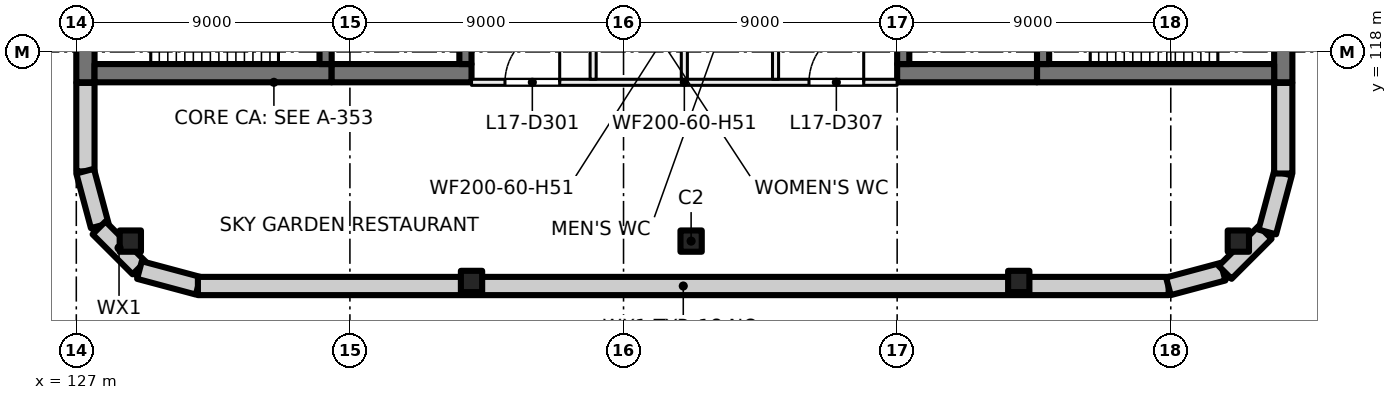
"""IFC4 building model, lengths in metres.
Left out: names, types, materials, properties, quantities, classifications, styles, units other than length and angle.
Written with IfcOpenShell. Run it as: python <this file> out.ifc"""

import sys

from ifc_helpers import new_model, si_unit, direction, frame, frame_2d, origin, origin_2d, place, context, subcontext, project, spatial, rectangle, extrude, element, fill, save


model = new_model("IFC4")
c1 = context("Model", 3, precision=1e-05, world=origin(), true_north=direction((0.0, 1.0)))
c2 = subcontext(c1, "Body", "Model", "MODEL_VIEW")
j1 = project(units=[si_unit("LENGTHUNIT", "METRE"), si_unit("PLANEANGLEUNIT", "RADIAN")], contexts=[c1])
p1 = place(None, origin())
s1 = spatial("IfcSite", under=j1, at=p1, CompositionType="ELEMENT")
p2 = place(p1, origin())
s2 = spatial("IfcBuilding", under=s1, at=p2, CompositionType="ELEMENT")
p3 = place(p2, frame((0.0, 0.0, 75.5)))
s3 = spatial("IfcBuildingStorey", under=s2, at=p3, CompositionType="ELEMENT", Elevation=75.5)
for number, where, z_axis, x_axis in (
    (1, (128.777, 111.777, 0.0), (0.0, 0.0, 1.0), (1.0, 0.0, 0.0)),
    (2, (140.0, 110.45, 0.0), (0.0, 0.0, 1.0), (1.0, 0.0, 0.0)),
    (3, (147.223, 111.777, 0.0), (0.0, 0.0, 1.0), (1.0, 0.0, 0.0)),
    (4, (165.223, 111.777, 0.0), (0.0, 0.0, 1.0), (1.0, 0.0, 0.0)),
    (5, (158.0, 110.45, 0.0), (0.0, 0.0, 1.0), (1.0, 0.0, 0.0)),
):
    element("IfcColumn", number, at=place(p3, frame(where, z_axis=z_axis, x_axis=x_axis)), inside=s3, PredefinedType="COLUMN", context=c2, shape_type="SweptSolid", body=[
        extrude(rectangle(XDim=0.7, YDim=0.7, at=origin_2d()), origin(), (0.0, 0.0, 1.0), 5.5),
    ])
p4 = place(p3, frame((127.3, 117.0, 0.0), z_axis=(0.0, 0.0, 1.0), x_axis=(0.0, 1.0, 0.0)))
e6 = element("IfcWall", 6, at=p4, inside=s3, PredefinedType="SHEAR", context=c2, shape_type="SweptSolid", body=[
    extrude(rectangle(XDim=3.8, YDim=0.6, at=frame_2d((1.9, 0.0))), origin(), (0.0, 0.0, 1.0), 5.5),
])
p5 = place(p3, frame((127.6, 117.3, 0.0), z_axis=(0.0, 0.0, 1.0), x_axis=(1.0, 0.0, 0.0)))
e7 = element("IfcWall", 7, at=p5, inside=s3, PredefinedType="SHEAR", context=c2, shape_type="SweptSolid", body=[
    extrude(rectangle(XDim=7.8, YDim=0.6, at=frame_2d((3.9, 0.0))), origin(), (0.0, 0.0, 1.0), 5.5),
])
p6 = place(p3, frame((135.4, 117.3, 0.0), z_axis=(0.0, 0.0, 1.0), x_axis=(1.0, 0.0, 0.0)))
e8 = element("IfcWall", 8, at=p6, inside=s3, PredefinedType="SHEAR", context=c2, shape_type="SweptSolid", body=[
    extrude(rectangle(XDim=4.6, YDim=0.6, at=frame_2d((2.3, 0.0))), origin(), (0.0, 0.0, 1.0), 5.5),
])
p7 = place(p3, frame((135.2, 117.6, 0.0), z_axis=(0.0, 0.0, 1.0), x_axis=(0.0, 1.0, 0.0)))
e9 = element("IfcWall", 9, at=p7, inside=s3, PredefinedType="SHEAR", context=c2, shape_type="SweptSolid", body=[
    extrude(rectangle(XDim=2.8, YDim=0.4, at=frame_2d((1.4, 0.0))), origin(), (0.0, 0.0, 1.0), 5.5),
])
p8 = place(p7, frame((0.9, 0.0, 0.0)))
e10 = element("IfcOpeningElement", 10, at=p8, cuts=e9, PredefinedType="OPENING", context=c2, shape_type="SweptSolid", body=[
    extrude(rectangle(XDim=1.0, YDim=2.1, at=frame_2d((0.5, 1.05))), frame((0.0, 0.21, 0.0), z_axis=(0.0, -1.0, 0.0), x_axis=(1.0, 0.0, 0.0)), (0.0, 0.0, 1.0), 0.42),
])
p9 = place(p3, frame((139.8, 117.6, 0.0), z_axis=(0.0, 0.0, 1.0), x_axis=(0.0, 1.0, 0.0)))
e11 = element("IfcWall", 11, at=p9, inside=s3, PredefinedType="SHEAR", context=c2, shape_type="SweptSolid", body=[
    extrude(rectangle(XDim=8.6, YDim=0.4, at=frame_2d((4.3, 0.0))), origin(), (0.0, 0.0, 1.0), 5.5),
])
p10 = place(p3, frame((166.7, 120.8, 0.0), z_axis=(0.0, 0.0, 1.0), x_axis=(0.0, -1.0, 0.0)))
e12 = element("IfcWall", 12, at=p10, inside=s3, PredefinedType="SHEAR", context=c2, shape_type="SweptSolid", body=[
    extrude(rectangle(XDim=3.8, YDim=0.6, at=frame_2d((1.9, 0.0))), origin(), (0.0, 0.0, 1.0), 5.5),
])
p11 = place(p3, frame((166.4, 117.3, 0.0), z_axis=(0.0, 0.0, 1.0), x_axis=(-1.0, 0.0, 0.0)))
e13 = element("IfcWall", 13, at=p11, inside=s3, PredefinedType="SHEAR", context=c2, shape_type="SweptSolid", body=[
    extrude(rectangle(XDim=7.8, YDim=0.6, at=frame_2d((3.9, 0.0))), origin(), (0.0, 0.0, 1.0), 5.5),
])
p12 = place(p3, frame((158.6, 117.3, 0.0), z_axis=(0.0, 0.0, 1.0), x_axis=(-1.0, 0.0, 0.0)))
e14 = element("IfcWall", 14, at=p12, inside=s3, PredefinedType="SHEAR", context=c2, shape_type="SweptSolid", body=[
    extrude(rectangle(XDim=4.6, YDim=0.6, at=frame_2d((2.3, 0.0))), origin(), (0.0, 0.0, 1.0), 5.5),
])
p13 = place(p3, frame((158.8, 120.4, 0.0), z_axis=(0.0, 0.0, 1.0), x_axis=(0.0, -1.0, 0.0)))
e15 = element("IfcWall", 15, at=p13, inside=s3, PredefinedType="SHEAR", context=c2, shape_type="SweptSolid", body=[
    extrude(rectangle(XDim=2.8, YDim=0.4, at=frame_2d((1.4, 0.0))), origin(), (0.0, 0.0, 1.0), 5.5),
])
p14 = place(p13, frame((0.9, 0.0, 0.0)))
e16 = element("IfcOpeningElement", 16, at=p14, cuts=e15, PredefinedType="OPENING", context=c2, shape_type="SweptSolid", body=[
    extrude(rectangle(XDim=1.0, YDim=2.1, at=frame_2d((0.5, 1.05))), frame((0.0, 0.21, 0.0), z_axis=(0.0, -1.0, 0.0), x_axis=(1.0, 0.0, 0.0)), (0.0, 0.0, 1.0), 0.42),
])
p15 = place(p3, frame((154.2, 126.2, 0.0), z_axis=(0.0, 0.0, 1.0), x_axis=(0.0, -1.0, 0.0)))
e17 = element("IfcWall", 17, at=p15, inside=s3, PredefinedType="SHEAR", context=c2, shape_type="SweptSolid", body=[
    extrude(rectangle(XDim=8.6, YDim=0.4, at=frame_2d((4.3, 0.0))), origin(), (0.0, 0.0, 1.0), 5.5),
])
p16 = place(p3, frame((127.3, 114.07, 0.0), z_axis=(0.0, 0.0, 1.0), x_axis=(0.0, 1.0, 0.0)))
e18 = element("IfcWall", 18, at=p16, inside=s3, PredefinedType="SOLIDWALL", context=c2, shape_type="SweptSolid", body=[
    extrude(rectangle(XDim=2.91, YDim=0.6, at=frame_2d((1.455, 0.0))), origin(), (0.0, 0.0, 1.0), 5.125),
])
for number, where, z_axis, x_axis in (
    (19, (127.771, 112.281, 0.0), (0.0, 0.0, 1.0), (-0.259, 0.966, 0.0)),
    (20, (129.064, 110.896, 0.0), (0.0, 0.0, 1.0), (-0.707, 0.707, 0.0)),
):
    element("IfcWall", number, at=place(p3, frame(where, z_axis=z_axis, x_axis=x_axis)), inside=s3, PredefinedType="SOLIDWALL", context=c2, shape_type="SweptSolid", body=[
        extrude(rectangle(XDim=1.861, YDim=0.6, at=frame_2d((0.93, 0.0))), origin(), (0.0, 0.0, 1.0), 5.125),
    ])
p17 = place(p3, frame((131.01, 110.308, 0.0), z_axis=(0.0, 0.0, 1.0), x_axis=(-0.965920269068, 0.258839784042, 0.0)))
e21 = element("IfcWall", 21, at=p17, inside=s3, PredefinedType="SOLIDWALL", context=c2, shape_type="SweptSolid", body=[
    extrude(rectangle(XDim=2.0, YDim=0.6, at=frame_2d((1.0, 0.0))), origin(), (0.0, 0.0, 1.0), 5.125),
])
p18 = place(p3, frame((162.93, 110.3, 0.0), z_axis=(0.0, 0.0, 1.0), x_axis=(-1.0, 0.0, 0.0)))
e22 = element("IfcWall", 22, at=p18, inside=s3, PredefinedType="SOLIDWALL", context=c2, shape_type="SweptSolid", body=[
    extrude(rectangle(XDim=31.93, YDim=0.6, at=frame_2d((15.965, 0.0))), origin(), (0.0, 0.0, 1.0), 5.125),
])
for number, where, z_axis, x_axis in (
    (23, (164.719, 110.771, 0.0), (0.0, 0.0, 1.0), (-0.966, -0.259, 0.0)),
    (24, (166.104, 112.064, 0.0), (0.0, 0.0, 1.0), (-0.707, -0.707, 0.0)),
):
    element("IfcWall", number, at=place(p3, frame(where, z_axis=z_axis, x_axis=x_axis)), inside=s3, PredefinedType="SOLIDWALL", context=c2, shape_type="SweptSolid", body=[
        extrude(rectangle(XDim=1.861, YDim=0.6, at=frame_2d((0.93, 0.0))), origin(), (0.0, 0.0, 1.0), 5.125),
    ])
p19 = place(p3, frame((166.692, 114.01, 0.0), z_axis=(0.0, 0.0, 1.0), x_axis=(-0.258839784042, -0.965920269068, 0.0)))
e25 = element("IfcWall", 25, at=p19, inside=s3, PredefinedType="SOLIDWALL", context=c2, shape_type="SweptSolid", body=[
    extrude(rectangle(XDim=2.0, YDim=0.6, at=frame_2d((1.0, 0.0))), origin(), (0.0, 0.0, 1.0), 5.125),
])
p20 = place(p3, frame((166.7, 116.98, 0.0), z_axis=(0.0, 0.0, 1.0), x_axis=(0.0, -1.0, 0.0)))
e26 = element("IfcWall", 26, at=p20, inside=s3, PredefinedType="SOLIDWALL", context=c2, shape_type="SweptSolid", body=[
    extrude(rectangle(XDim=2.98, YDim=0.6, at=frame_2d((1.49, 0.0))), origin(), (0.0, 0.0, 1.0), 5.125),
])
p21 = place(p3, frame((154.0, 117.0, 0.0), z_axis=(0.0, 0.0, 1.0), x_axis=(-1.0, 0.0, 0.0)))
e27 = element("IfcWall", 27, at=p21, inside=s3, PredefinedType="PARTITIONING", context=c2, shape_type="SweptSolid", body=[
    extrude(rectangle(XDim=14.0, YDim=0.2, at=frame_2d((7.0, 0.0))), origin(), (0.0, 0.0, 1.0), 5.125),
])
p22 = place(p21, frame((11.1, 0.0, 0.0)))
e28 = element("IfcOpeningElement", 28, at=p22, cuts=e27, PredefinedType="OPENING", context=c2, shape_type="SweptSolid", body=[
    extrude(rectangle(XDim=1.8, YDim=2.1, at=frame_2d((0.9, 1.05))), frame((0.0, 0.11, 0.0), z_axis=(0.0, -1.0, 0.0), x_axis=(1.0, 0.0, 0.0)), (0.0, 0.0, 1.0), 0.22),
])
p23 = place(p21, frame((1.1, 0.0, 0.0)))
e29 = element("IfcOpeningElement", 29, at=p23, cuts=e27, PredefinedType="OPENING", context=c2, shape_type="SweptSolid", body=[
    extrude(rectangle(XDim=1.8, YDim=2.1, at=frame_2d((0.9, 1.05))), frame((0.0, 0.11, 0.0), z_axis=(0.0, -1.0, 0.0), x_axis=(1.0, 0.0, 0.0)), (0.0, 0.0, 1.0), 0.22),
])
p24 = place(p3, frame((144.0, 138.9, 0.0), z_axis=(0.0, 0.0, 1.0), x_axis=(0.0, -1.0, 0.0)))
e30 = element("IfcWall", 30, at=p24, inside=s3, PredefinedType="PARTITIONING", context=c2, shape_type="SweptSolid", body=[
    extrude(rectangle(XDim=21.8, YDim=0.2, at=frame_2d((10.9, 0.0))), origin(), (0.0, 0.0, 1.0), 5.125),
])
p25 = place(p24, frame((18.898, 0.0, 0.0)))
e31 = element("IfcOpeningElement", 31, at=p25, cuts=e30, PredefinedType="OPENING", context=c2, shape_type="SweptSolid", body=[
    extrude(rectangle(XDim=1.0, YDim=2.1, at=frame_2d((0.5, 1.05))), frame((0.0, 0.11, 0.0), z_axis=(0.0, -1.0, 0.0), x_axis=(1.0, 0.0, 0.0)), (0.0, 0.0, 1.0), 0.22),
])
p26 = place(p24, frame((7.502, 0.0, 0.0)))
e32 = element("IfcOpeningElement", 32, at=p26, cuts=e30, PredefinedType="OPENING", context=c2, shape_type="SweptSolid", body=[
    extrude(rectangle(XDim=1.8, YDim=2.1, at=frame_2d((0.9, 1.05))), frame((0.0, 0.11, 0.0), z_axis=(0.0, -1.0, 0.0), x_axis=(1.0, 0.0, 0.0)), (0.0, 0.0, 1.0), 0.22),
])
p27 = place(p3, frame((147.0, 117.1, 0.0), z_axis=(0.0, 0.0, 1.0), x_axis=(0.0, 1.0, 0.0)))
e33 = element("IfcWall", 33, at=p27, inside=s3, PredefinedType="PARTITIONING", context=c2, shape_type="SweptSolid", body=[
    extrude(rectangle(XDim=4.8, YDim=0.2, at=frame_2d((2.4, 0.0))), origin(), (0.0, 0.0, 1.0), 5.125),
])
p28 = place(p3, frame((150.0, 117.1, 0.0), z_axis=(0.0, 0.0, 1.0), x_axis=(0.0, 1.0, 0.0)))
e34 = element("IfcWall", 34, at=p28, inside=s3, PredefinedType="PARTITIONING", context=c2, shape_type="SweptSolid", body=[
    extrude(rectangle(XDim=21.8, YDim=0.2, at=frame_2d((10.9, 0.0))), origin(), (0.0, 0.0, 1.0), 5.125),
])
p29 = place(p28, frame((2.402, 0.0, 0.0)))
e35 = element("IfcOpeningElement", 35, at=p29, cuts=e34, PredefinedType="OPENING", context=c2, shape_type="SweptSolid", body=[
    extrude(rectangle(XDim=1.0, YDim=2.1, at=frame_2d((0.5, 1.05))), frame((0.0, 0.11, 0.0), z_axis=(0.0, -1.0, 0.0), x_axis=(1.0, 0.0, 0.0)), (0.0, 0.0, 1.0), 0.22),
])
p30 = place(p28, frame((12.498, 0.0, 0.0)))
e36 = element("IfcOpeningElement", 36, at=p30, cuts=e34, PredefinedType="OPENING", context=c2, shape_type="SweptSolid", body=[
    extrude(rectangle(XDim=1.8, YDim=2.1, at=frame_2d((0.9, 1.05))), frame((0.0, 0.11, 0.0), z_axis=(0.0, -1.0, 0.0), x_axis=(1.0, 0.0, 0.0)), (0.0, 0.0, 1.0), 0.22),
])
p31 = place(p22, origin())
e37 = element("IfcDoor", 37, at=p31, inside=s3, OperationType="DOUBLE_DOOR_SINGLE_SWING", PredefinedType="DOOR", context=c2, shape_type="SweptSolid", body=[
    extrude(rectangle(XDim=1.8, YDim=2.1, at=frame_2d((0.9, 1.05))), frame((0.0, 0.025, 0.0), z_axis=(0.0, -1.0, 0.0), x_axis=(1.0, 0.0, 0.0)), (0.0, 0.0, 1.0), 0.05),
])
fill(e28, e37)
p32 = place(p23, origin())
e38 = element("IfcDoor", 38, at=p32, inside=s3, OperationType="DOUBLE_DOOR_SINGLE_SWING", PredefinedType="DOOR", context=c2, shape_type="SweptSolid", body=[
    extrude(rectangle(XDim=1.8, YDim=2.1, at=frame_2d((0.9, 1.05))), frame((0.0, 0.025, 0.0), z_axis=(0.0, -1.0, 0.0), x_axis=(1.0, 0.0, 0.0)), (0.0, 0.0, 1.0), 0.05),
])
fill(e29, e38)
save(model, sys.argv[1])
